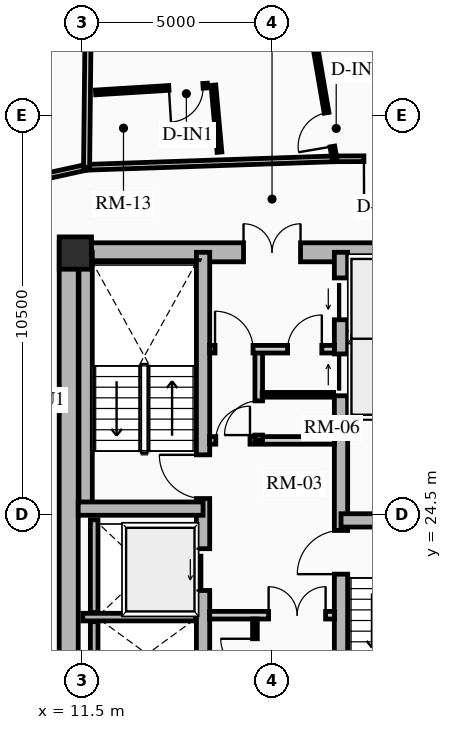
"""IFC4 building model, lengths in metres.
Left out: names, types, materials, properties, quantities, classifications, styles, units other than length and angle.
Written with IfcOpenShell. Run it as: python <this file> out.ifc"""

import sys

from ifc_helpers import new_model, si_unit, direction, frame, frame_2d, origin, origin_2d, place, context, subcontext, project, spatial, rectangle, extrude, source, transform, mapped, element, fill, save


model = new_model("IFC4")
c1 = context("Model", 3, precision=1e-05, world=origin(), true_north=direction((0.0, 1.0)))
c2 = subcontext(c1, "Body", "Model", "MODEL_VIEW")
j1 = project(units=[si_unit("LENGTHUNIT", "METRE"), si_unit("PLANEANGLEUNIT", "RADIAN")], contexts=[c1])
p1 = place(None, origin())
s1 = spatial("IfcSite", under=j1, at=p1, CompositionType="ELEMENT")
p2 = place(p1, origin())
s2 = spatial("IfcBuilding", under=s1, at=p2, CompositionType="ELEMENT")
p3 = place(p2, frame((0.0, 0.0, 36.55)))
s3 = spatial("IfcBuildingStorey", under=s2, at=p3, CompositionType="ELEMENT", Elevation=36.55)
p4 = place(p3, frame((11.15, 17.35, 0.0), z_axis=(0.0, 0.0, 1.0), x_axis=(0.0, 1.0, 0.0)))
e1 = element("IfcWall", 1, at=p4, inside=s3, PredefinedType="SHEAR", context=c2, shape_type="SweptSolid", body=[
    extrude(rectangle(XDim=14.3, YDim=0.5, at=frame_2d((7.15, 0.0))), origin(), (0.0, 0.0, 1.0), 2.91),
])
p5 = place(p3, frame((11.15, 31.4, 0.0), z_axis=(0.0, 0.0, 1.0), x_axis=(1.0, 0.0, 0.0)))
e2 = element("IfcWall", 2, at=p5, inside=s3, PredefinedType="SHEAR", context=c2, shape_type="SweptSolid", body=[
    extrude(rectangle(XDim=10.7, YDim=0.5, at=frame_2d((5.35, 0.0))), origin(), (0.0, 0.0, 1.0), 2.91),
])
m1 = source(origin(), c2, "Body", "SweptSolid", [
    extrude(rectangle(XDim=1.5, YDim=2.02, at=frame_2d((0.75, 1.01))), frame((0.0, 0.26, 0.0), z_axis=(0.0, -1.0, 0.0), x_axis=(1.0, 0.0, 0.0)), (0.0, 0.0, 1.0), 0.52),
])
p6 = place(p5, frame((4.6, 0.0, 0.0)))
e3 = element("IfcOpeningElement", 3, at=p6, cuts=e2, PredefinedType="OPENING", context=c2, shape_type="MappedRepresentation", body=[
    mapped(m1, transform((0.0, 0.0, 0.0), x_axis=(1.0, 0.0, 0.0), y_axis=(0.0, 1.0, 0.0), z_axis=(0.0, 0.0, 1.0), scale=1.0)),
])
p7 = place(p3, frame((14.685, 17.6, 0.0), z_axis=(0.0, 0.0, 1.0), x_axis=(0.0, 1.0, 0.0)))
e4 = element("IfcWall", 4, at=p7, inside=s3, PredefinedType="SHEAR", context=c2, shape_type="SweptSolid", body=[
    extrude(rectangle(XDim=13.8, YDim=0.35, at=frame_2d((6.9, 0.0))), origin(), (0.0, 0.0, 1.0), 2.91),
])
m2 = source(origin(), c2, "Body", "SweptSolid", [
    extrude(rectangle(XDim=1.1, YDim=2.015, at=frame_2d((0.55, 1.007))), frame((0.0, 0.185, 0.0), z_axis=(0.0, -1.0, 0.0), x_axis=(1.0, 0.0, 0.0)), (0.0, 0.0, 1.0), 0.37),
])
p8 = place(p7, frame((4.9, 0.0, 0.0)))
e5 = element("IfcOpeningElement", 5, at=p8, cuts=e4, PredefinedType="OPENING", context=c2, shape_type="MappedRepresentation", body=[
    mapped(m2, transform((0.0, 0.0, 0.0), x_axis=(1.0, 0.0, 0.0), y_axis=(0.0, 1.0, 0.0), z_axis=(0.0, 0.0, 1.0), scale=1.0)),
])
m3 = source(origin(), c2, "Body", "SweptSolid", [
    extrude(rectangle(XDim=1.15, YDim=2.02, at=frame_2d((0.575, 1.01))), frame((0.0, 0.185, 0.0), z_axis=(0.0, -1.0, 0.0), x_axis=(1.0, 0.0, 0.0)), (0.0, 0.0, 1.0), 0.37),
])
p9 = place(p7, frame((7.32, 0.0, 0.0)))
e6 = element("IfcOpeningElement", 6, at=p9, cuts=e4, PredefinedType="OPENING", context=c2, shape_type="MappedRepresentation", body=[
    mapped(m3, transform((0.0, 0.0, 0.0), x_axis=(1.0, 0.0, 0.0), y_axis=(0.0, 1.0, 0.0), z_axis=(0.0, 0.0, 1.0), scale=1.0)),
])
p10 = place(p3, frame((18.315, 17.6, 0.0), z_axis=(0.0, 0.0, 1.0), x_axis=(0.0, 1.0, 0.0)))
e7 = element("IfcWall", 7, at=p10, inside=s3, PredefinedType="SHEAR", context=c2, shape_type="SweptSolid", body=[
    extrude(rectangle(XDim=13.8, YDim=0.35, at=frame_2d((6.9, 0.0))), origin(), (0.0, 0.0, 1.0), 2.91),
])
p11 = place(p10, frame((10.025, 0.0, 0.0)))
e8 = element("IfcOpeningElement", 8, at=p11, cuts=e7, PredefinedType="OPENING", context=c2, shape_type="MappedRepresentation", body=[
    mapped(m2, transform((0.0, 0.0, 0.0), x_axis=(1.0, 0.0, 0.0), y_axis=(0.0, 1.0, 0.0), z_axis=(0.0, 0.0, 1.0), scale=1.0)),
])
p12 = place(p10, frame((12.025, 0.0, 0.0)))
e9 = element("IfcOpeningElement", 9, at=p12, cuts=e7, PredefinedType="OPENING", context=c2, shape_type="MappedRepresentation", body=[
    mapped(m2, transform((0.0, 0.0, 0.0), x_axis=(1.0, 0.0, 0.0), y_axis=(0.0, 1.0, 0.0), z_axis=(0.0, 0.0, 1.0), scale=1.0)),
])
p13 = place(p10, frame((5.33, 0.0, 0.0)))
e10 = element("IfcOpeningElement", 10, at=p13, cuts=e7, PredefinedType="OPENING", context=c2, shape_type="MappedRepresentation", body=[
    mapped(m3, transform((0.0, 0.0, 0.0), x_axis=(1.0, 0.0, 0.0), y_axis=(0.0, 1.0, 0.0), z_axis=(0.0, 0.0, 1.0), scale=1.0)),
])
p14 = place(p3, frame((11.595, 24.655, 0.0), z_axis=(0.0, 0.0, 1.0), x_axis=(0.0, 1.0, 0.0)))
e11 = element("IfcWall", 11, at=p14, inside=s3, PredefinedType="SHEAR", context=c2, shape_type="SweptSolid", body=[
    extrude(rectangle(XDim=6.745, YDim=0.35, at=frame_2d((3.373, 0.0))), origin(), (0.0, 0.0, 1.0), 2.91),
])
for number, where, z_axis, x_axis in (
    (12, (11.4, 24.655, 0.0), (0.0, 0.0, 1.0), (1.0, 0.0, 0.0)),
    (13, (18.315, 24.345, 0.0), (0.0, 0.0, 1.0), (1.0, 0.0, 0.0)),
):
    element("IfcWall", number, at=place(p3, frame(where, z_axis=z_axis, x_axis=x_axis)), inside=s3, PredefinedType="SHEAR", context=c2, shape_type="SweptSolid", body=[
        extrude(rectangle(XDim=3.285, YDim=0.35, at=frame_2d((1.643, 0.0))), origin(), (0.0, 0.0, 1.0), 2.91),
    ])
p15 = place(p3, frame((11.325, 31.38, 0.0), z_axis=(0.0, 0.0, 1.0), x_axis=(1.0, 0.0, 0.0)))
e14 = element("IfcColumn", 14, at=p15, inside=s3, PredefinedType="COLUMN", context=c2, shape_type="SweptSolid", body=[
    extrude(rectangle(XDim=0.85, YDim=0.85, at=origin_2d()), origin(), (0.0, 0.0, 1.0), 2.91),
])
p16 = place(p3, frame((11.52, 21.8, 0.0), z_axis=(0.0, 0.0, 1.0), x_axis=(1.0, 0.0, 0.0)))
e15 = element("IfcWall", 15, at=p16, inside=s3, PredefinedType="SHEAR", context=c2, shape_type="SweptSolid", body=[
    extrude(rectangle(XDim=2.97, YDim=0.2, at=frame_2d((1.485, 0.0))), origin(), (0.0, 0.0, 1.0), 2.91),
])
p17 = place(p3, frame((11.82, 21.92, 0.0), z_axis=(0.0, 0.0, 1.0), x_axis=(0.0, 1.0, 0.0)))
e16 = element("IfcWall", 16, at=p17, inside=s3, PredefinedType="SHEAR", context=c2, shape_type="SweptSolid", body=[
    extrude(rectangle(XDim=2.44, YDim=0.2, at=frame_2d((1.22, 0.0))), origin(), (0.0, 0.0, 1.0), 2.91),
])
p18 = place(p3, frame((11.82, 19.945, 0.0), z_axis=(0.0, 0.0, 1.0), x_axis=(0.0, 1.0, 0.0)))
e17 = element("IfcWall", 17, at=p18, inside=s3, PredefinedType="SHEAR", context=c2, shape_type="SweptSolid", body=[
    extrude(rectangle(XDim=1.735, YDim=0.2, at=frame_2d((0.867, 0.0))), origin(), (0.0, 0.0, 1.0), 2.91),
])
for number, where, z_axis, x_axis in (
    (18, (18.51, 27.13, 0.0), (0.0, 0.0, 1.0), (1.0, 0.0, 0.0)),
    (19, (18.51, 29.175, 0.0), (0.0, 0.0, 1.0), (1.0, 0.0, 0.0)),
):
    element("IfcWall", number, at=place(p3, frame(where, z_axis=z_axis, x_axis=x_axis)), inside=s3, PredefinedType="SHEAR", context=c2, shape_type="SweptSolid", body=[
        extrude(rectangle(XDim=2.97, YDim=0.2, at=frame_2d((1.485, 0.0))), origin(), (0.0, 0.0, 1.0), 2.91),
    ])
p19 = place(p3, frame((14.86, 21.85, 0.0), z_axis=(0.0, 0.0, 1.0), x_axis=(1.0, 0.0, 0.0)))
e20 = element("IfcWall", 20, at=p19, inside=s3, PredefinedType="PARTITIONING", context=c2, shape_type="SweptSolid", body=[
    extrude(rectangle(XDim=3.28, YDim=0.2, at=frame_2d((1.64, 0.0))), origin(), (0.0, 0.0, 1.0), 2.635),
])
m4 = source(origin(), c2, "Body", "SweptSolid", [
    extrude(rectangle(XDim=1.5, YDim=2.02, at=frame_2d((0.75, 1.01))), frame((0.0, 0.11, 0.0), z_axis=(0.0, -1.0, 0.0), x_axis=(1.0, 0.0, 0.0)), (0.0, 0.0, 1.0), 0.22),
])
p20 = place(p19, frame((1.55, 0.0, 0.0)))
e21 = element("IfcOpeningElement", 21, at=p20, cuts=e20, PredefinedType="OPENING", context=c2, shape_type="MappedRepresentation", body=[
    mapped(m4, transform((0.0, 0.0, 0.0), x_axis=(1.0, 0.0, 0.0), y_axis=(0.0, 1.0, 0.0), z_axis=(0.0, 0.0, 1.0), scale=1.0)),
])
p21 = place(p3, frame((14.86, 26.45, 0.0), z_axis=(0.0, 0.0, 1.0), x_axis=(1.0, 0.0, 0.0)))
e22 = element("IfcWall", 22, at=p21, inside=s3, PredefinedType="PARTITIONING", context=c2, shape_type="SweptSolid", body=[
    extrude(rectangle(XDim=3.28, YDim=0.2, at=frame_2d((1.64, 0.0))), origin(), (0.0, 0.0, 1.0), 2.635),
])
m5 = source(origin(), c2, "Body", "SweptSolid", [
    extrude(rectangle(XDim=0.9, YDim=2.005, at=frame_2d((0.45, 1.002))), frame((0.0, 0.11, 0.0), z_axis=(0.0, -1.0, 0.0), x_axis=(1.0, 0.0, 0.0)), (0.0, 0.0, 1.0), 0.22),
])
p22 = place(p21, frame((0.16, 0.0, 0.0)))
e23 = element("IfcOpeningElement", 23, at=p22, cuts=e22, PredefinedType="OPENING", context=c2, shape_type="MappedRepresentation", body=[
    mapped(m5, transform((0.0, 0.0, 0.0), x_axis=(1.0, 0.0, 0.0), y_axis=(0.0, 1.0, 0.0), z_axis=(0.0, 0.0, 1.0), scale=1.0)),
])
p23 = place(p3, frame((16.15, 26.45, 0.0), z_axis=(0.0, 0.0, 1.0), x_axis=(0.0, 1.0, 0.0)))
e24 = element("IfcWall", 24, at=p23, inside=s3, PredefinedType="PARTITIONING", context=c2, shape_type="SweptSolid", body=[
    extrude(rectangle(XDim=2.4, YDim=0.2, at=frame_2d((1.2, 0.0))), origin(), (0.0, 0.0, 1.0), 2.635),
])
p24 = place(p23, frame((0.14, 0.0, 0.0)))
e25 = element("IfcOpeningElement", 25, at=p24, cuts=e24, PredefinedType="OPENING", context=c2, shape_type="MappedRepresentation", body=[
    mapped(m5, transform((0.0, 0.0, 0.0), x_axis=(1.0, 0.0, 0.0), y_axis=(0.0, 1.0, 0.0), z_axis=(0.0, 0.0, 1.0), scale=1.0)),
])
p25 = place(p3, frame((14.86, 28.85, 0.0), z_axis=(0.0, 0.0, 1.0), x_axis=(1.0, 0.0, 0.0)))
e26 = element("IfcWall", 26, at=p25, inside=s3, PredefinedType="PARTITIONING", context=c2, shape_type="SweptSolid", body=[
    extrude(rectangle(XDim=3.28, YDim=0.2, at=frame_2d((1.64, 0.0))), origin(), (0.0, 0.0, 1.0), 2.635),
])
m6 = source(origin(), c2, "Body", "SweptSolid", [
    extrude(rectangle(XDim=1.0, YDim=2.015, at=frame_2d((0.5, 1.007))), frame((0.0, 0.11, 0.0), z_axis=(0.0, -1.0, 0.0), x_axis=(1.0, 0.0, 0.0)), (0.0, 0.0, 1.0), 0.22),
])
p26 = place(p25, frame((0.14, 0.0, 0.0)))
e27 = element("IfcOpeningElement", 27, at=p26, cuts=e26, PredefinedType="OPENING", context=c2, shape_type="MappedRepresentation", body=[
    mapped(m6, transform((0.0, 0.0, 0.0), x_axis=(1.0, 0.0, 0.0), y_axis=(0.0, 1.0, 0.0), z_axis=(0.0, 0.0, 1.0), scale=1.0)),
])
p27 = place(p25, frame((2.05, 0.0, 0.0)))
e28 = element("IfcOpeningElement", 28, at=p27, cuts=e26, PredefinedType="OPENING", context=c2, shape_type="MappedRepresentation", body=[
    mapped(m5, transform((0.0, 0.0, 0.0), x_axis=(1.0, 0.0, 0.0), y_axis=(0.0, 1.0, 0.0), z_axis=(0.0, 0.0, 1.0), scale=1.0)),
])
p28 = place(p3, frame((16.05, 19.88, 0.0), z_axis=(0.0, 0.0, 1.0), x_axis=(0.0, 1.0, 0.0)))
e29 = element("IfcWall", 29, at=p28, inside=s3, PredefinedType="PARTITIONING", context=c2, shape_type="SweptSolid", body=[
    extrude(rectangle(XDim=1.87, YDim=0.125, at=frame_2d((0.935, 0.0))), origin(), (0.0, 0.0, 1.0), 2.635),
])
m7 = source(origin(), c2, "Body", "SweptSolid", [
    extrude(rectangle(XDim=0.9, YDim=2.005, at=frame_2d((0.45, 1.002))), frame((0.0, 0.073, 0.0), z_axis=(0.0, -1.0, 0.0), x_axis=(1.0, 0.0, 0.0)), (0.0, 0.0, 1.0), 0.145),
])
p29 = place(p28, frame((0.45, 0.0, 0.0)))
e30 = element("IfcOpeningElement", 30, at=p29, cuts=e29, PredefinedType="OPENING", context=c2, shape_type="MappedRepresentation", body=[
    mapped(m7, transform((0.0, 0.0, 0.0), x_axis=(1.0, 0.0, 0.0), y_axis=(0.0, 1.0, 0.0), z_axis=(0.0, 0.0, 1.0), scale=1.0)),
])
p30 = place(p3, frame((16.24, 27.65, 0.0), z_axis=(0.0, 0.0, 1.0), x_axis=(1.0, 0.0, 0.0)))
e31 = element("IfcWall", 31, at=p30, inside=s3, PredefinedType="PARTITIONING", context=c2, shape_type="SweptSolid", body=[
    extrude(rectangle(XDim=1.88, YDim=0.125, at=frame_2d((0.94, 0.0))), origin(), (0.0, 0.0, 1.0), 2.635),
])
p31 = place(p3, frame((21.527, 33.873, 0.0), z_axis=(0.0, 0.0, 1.0), x_axis=(-0.999991838845, -0.004040079574, 0.0)))
e32 = element("IfcWall", 32, at=p31, inside=s3, PredefinedType="PARTITIONING", context=c2, shape_type="SweptSolid", body=[
    extrude(rectangle(XDim=3.384, YDim=0.15, at=frame_2d((1.692, 0.0))), origin(), (0.0, 0.0, 1.0), 2.159),
])
m8 = source(origin(), c2, "Body", "SweptSolid", [
    extrude(rectangle(XDim=1.05, YDim=2.015, at=frame_2d((0.525, 1.007))), frame((0.0, 0.085, 0.0), z_axis=(0.0, -1.0, 0.0), x_axis=(1.0, 0.0, 0.0)), (0.0, 0.0, 1.0), 0.17),
])
p32 = place(p31, frame((1.56, 0.0, 0.0)))
e33 = element("IfcOpeningElement", 33, at=p32, cuts=e32, PredefinedType="OPENING", context=c2, shape_type="MappedRepresentation", body=[
    mapped(m8, transform((0.0, 0.0, 0.0), x_axis=(1.0, 0.0, 0.0), y_axis=(0.0, 1.0, 0.0), z_axis=(0.0, 0.0, 1.0), scale=1.0)),
])
p33 = place(p3, frame((18.143, 33.86, 0.0), z_axis=(0.0, 0.0, 1.0), x_axis=(-0.999419208319, -0.034077060363, 0.0)))
e34 = element("IfcWall", 34, at=p33, inside=s3, PredefinedType="PARTITIONING", context=c2, shape_type="SweptSolid", body=[
    extrude(rectangle(XDim=6.527, YDim=0.15, at=frame_2d((3.263, 0.0))), origin(), (0.0, 0.0, 1.0), 2.159),
])
p34 = place(p3, frame((11.62, 33.637, 0.0), z_axis=(0.0, 0.0, 1.0), x_axis=(-0.97702579435, -0.213121085711, 0.0)))
e35 = element("IfcWall", 35, at=p34, inside=s3, PredefinedType="PARTITIONING", context=c2, shape_type="SweptSolid", body=[
    extrude(rectangle(XDim=1.935, YDim=0.15, at=frame_2d((0.967, 0.0))), origin(), (0.0, 0.0, 1.0), 2.159),
])
p35 = place(p3, frame((11.62, 33.637, 0.0), z_axis=(0.0, 0.0, 1.0), x_axis=(0.01090774254, 0.999940508807, 0.0)))
e36 = element("IfcWall", 36, at=p35, inside=s3, PredefinedType="PARTITIONING", context=c2, shape_type="SweptSolid", body=[
    extrude(rectangle(XDim=8.886, YDim=0.16, at=frame_2d((4.443, 0.0))), origin(), (0.0, 0.0, 1.0), 2.073),
])
p36 = place(p3, frame((18.143, 33.86, 0.0), z_axis=(0.0, 0.0, 1.0), x_axis=(-0.168840545196, 0.985643378864, 0.0)))
e37 = element("IfcWall", 37, at=p36, inside=s3, PredefinedType="PARTITIONING", context=c2, shape_type="SweptSolid", body=[
    extrude(rectangle(XDim=9.73, YDim=0.125, at=frame_2d((4.865, 0.0))), origin(), (0.0, 0.0, 1.0), 2.073),
])
p37 = place(p36, frame((0.33, 0.0, 0.0)))
e38 = element("IfcOpeningElement", 38, at=p37, cuts=e37, PredefinedType="OPENING", context=c2, shape_type="MappedRepresentation", body=[
    mapped(m7, transform((0.0, 0.0, 0.0), x_axis=(1.0, 0.0, 0.0), y_axis=(0.0, 1.0, 0.0), z_axis=(0.0, 0.0, 1.0), scale=1.0)),
])
p38 = place(p3, frame((15.117, 34.035, 0.0), z_axis=(0.0, 0.0, 1.0), x_axis=(-0.090498430303, 0.995896598103, 0.0)))
e39 = element("IfcWall", 39, at=p38, inside=s3, PredefinedType="PARTITIONING", context=c2, shape_type="SweptSolid", body=[
    extrude(rectangle(XDim=1.77, YDim=0.125, at=frame_2d((0.885, 0.0))), origin(), (0.0, 0.0, 1.0), 2.635),
])
p39 = place(p3, frame((14.803, 35.788, 0.0), z_axis=(0.0, 0.0, 1.0), x_axis=(-0.998116078946, -0.06135383403, 0.0)))
e40 = element("IfcWall", 40, at=p39, inside=s3, PredefinedType="PARTITIONING", context=c2, shape_type="SweptSolid", body=[
    extrude(rectangle(XDim=2.953, YDim=0.125, at=frame_2d((1.476, 0.0))), origin(), (0.0, 0.0, 1.0), 2.159),
])
p40 = place(p39, frame((0.12, 0.0, 0.0)))
e41 = element("IfcOpeningElement", 41, at=p40, cuts=e40, PredefinedType="OPENING", context=c2, shape_type="MappedRepresentation", body=[
    mapped(m7, transform((0.0, 0.0, 0.0), x_axis=(1.0, 0.0, 0.0), y_axis=(0.0, 1.0, 0.0), z_axis=(0.0, 0.0, 1.0), scale=1.0)),
])
m9 = source(origin(), c2, "Body", "SweptSolid", [
    extrude(rectangle(XDim=1.1, YDim=2.015, at=frame_2d((0.55, 1.007))), frame((0.0, 0.025, 0.0), z_axis=(0.0, -1.0, 0.0), x_axis=(1.0, 0.0, 0.0)), (0.0, 0.0, 1.0), 0.05),
])
p41 = place(p8, origin())
e42 = element("IfcDoor", 42, at=p41, inside=s3, OperationType="SLIDING_TO_LEFT", PredefinedType="DOOR", context=c2, shape_type="MappedRepresentation", body=[
    mapped(m9, transform((0.0, 0.0, 0.0), x_axis=(1.0, 0.0, 0.0), y_axis=(0.0, 1.0, 0.0), z_axis=(0.0, 0.0, 1.0), scale=1.0)),
])
fill(e5, e42)
p42 = place(p11, origin())
e43 = element("IfcDoor", 43, at=p42, inside=s3, OperationType="SLIDING_TO_RIGHT", PredefinedType="DOOR", context=c2, shape_type="MappedRepresentation", body=[
    mapped(m9, transform((0.0, 0.0, 0.0), x_axis=(1.0, 0.0, 0.0), y_axis=(0.0, 1.0, 0.0), z_axis=(0.0, 0.0, 1.0), scale=1.0)),
])
fill(e8, e43)
p43 = place(p12, origin())
e44 = element("IfcDoor", 44, at=p43, inside=s3, OperationType="SLIDING_TO_LEFT", PredefinedType="DOOR", context=c2, shape_type="MappedRepresentation", body=[
    mapped(m9, transform((0.0, 0.0, 0.0), x_axis=(1.0, 0.0, 0.0), y_axis=(0.0, 1.0, 0.0), z_axis=(0.0, 0.0, 1.0), scale=1.0)),
])
fill(e9, e44)
m10 = source(origin(), c2, "Body", "SweptSolid", [
    extrude(rectangle(XDim=1.15, YDim=2.02, at=frame_2d((0.575, 1.01))), frame((0.0, 0.025, 0.0), z_axis=(0.0, -1.0, 0.0), x_axis=(1.0, 0.0, 0.0)), (0.0, 0.0, 1.0), 0.05),
])
p44 = place(p9, origin())
e45 = element("IfcDoor", 45, at=p44, inside=s3, OperationType="SINGLE_SWING_RIGHT", PredefinedType="DOOR", context=c2, shape_type="MappedRepresentation", body=[
    mapped(m10, transform((0.0, 0.0, 0.0), x_axis=(1.0, 0.0, 0.0), y_axis=(0.0, 1.0, 0.0), z_axis=(0.0, 0.0, 1.0), scale=1.0)),
])
fill(e6, e45)
p45 = place(p13, origin())
e46 = element("IfcDoor", 46, at=p45, inside=s3, OperationType="SINGLE_SWING_LEFT", PredefinedType="DOOR", context=c2, shape_type="MappedRepresentation", body=[
    mapped(m10, transform((0.0, 0.0, 0.0), x_axis=(1.0, 0.0, 0.0), y_axis=(0.0, 1.0, 0.0), z_axis=(0.0, 0.0, 1.0), scale=1.0)),
])
fill(e10, e46)
m11 = source(origin(), c2, "Body", "SweptSolid", [
    extrude(rectangle(XDim=1.5, YDim=2.02, at=frame_2d((0.75, 1.01))), frame((0.0, 0.025, 0.0), z_axis=(0.0, -1.0, 0.0), x_axis=(1.0, 0.0, 0.0)), (0.0, 0.0, 1.0), 0.05),
])
p46 = place(p6, origin())
e47 = element("IfcDoor", 47, at=p46, inside=s3, OperationType="DOUBLE_DOOR_SINGLE_SWING", PredefinedType="DOOR", context=c2, shape_type="MappedRepresentation", body=[
    mapped(m11, transform((0.0, 0.0, 0.0), x_axis=(1.0, 0.0, 0.0), y_axis=(0.0, 1.0, 0.0), z_axis=(0.0, 0.0, 1.0), scale=1.0)),
])
fill(e3, e47)
p47 = place(p20, origin())
e48 = element("IfcDoor", 48, at=p47, inside=s3, OperationType="DOUBLE_DOOR_SINGLE_SWING", PredefinedType="DOOR", context=c2, shape_type="MappedRepresentation", body=[
    mapped(m11, transform((0.0, 0.0, 0.0), x_axis=(1.0, 0.0, 0.0), y_axis=(0.0, 1.0, 0.0), z_axis=(0.0, 0.0, 1.0), scale=1.0)),
])
fill(e21, e48)
m12 = source(origin(), c2, "Body", "SweptSolid", [
    extrude(rectangle(XDim=0.9, YDim=2.005, at=frame_2d((0.45, 1.002))), frame((0.0, 0.025, 0.0), z_axis=(0.0, -1.0, 0.0), x_axis=(1.0, 0.0, 0.0)), (0.0, 0.0, 1.0), 0.05),
])
p48 = place(p22, origin())
e49 = element("IfcDoor", 49, at=p48, inside=s3, OperationType="SINGLE_SWING_RIGHT", PredefinedType="DOOR", context=c2, shape_type="MappedRepresentation", body=[
    mapped(m12, transform((0.0, 0.0, 0.0), x_axis=(1.0, 0.0, 0.0), y_axis=(0.0, 1.0, 0.0), z_axis=(0.0, 0.0, 1.0), scale=1.0)),
])
fill(e23, e49)
m13 = source(origin(), c2, "Body", "SweptSolid", [
    extrude(rectangle(XDim=1.0, YDim=2.015, at=frame_2d((0.5, 1.007))), frame((0.0, 0.025, 0.0), z_axis=(0.0, -1.0, 0.0), x_axis=(1.0, 0.0, 0.0)), (0.0, 0.0, 1.0), 0.05),
])
p49 = place(p26, origin())
e50 = element("IfcDoor", 50, at=p49, inside=s3, OperationType="SINGLE_SWING_LEFT", PredefinedType="DOOR", context=c2, shape_type="MappedRepresentation", body=[
    mapped(m13, transform((0.0, 0.0, 0.0), x_axis=(1.0, 0.0, 0.0), y_axis=(0.0, 1.0, 0.0), z_axis=(0.0, 0.0, 1.0), scale=1.0)),
])
fill(e27, e50)
p50 = place(p29, origin())
e51 = element("IfcDoor", 51, at=p50, inside=s3, OperationType="SINGLE_SWING_RIGHT", PredefinedType="DOOR", context=c2, shape_type="MappedRepresentation", body=[
    mapped(m12, transform((0.0, 0.0, 0.0), x_axis=(1.0, 0.0, 0.0), y_axis=(0.0, 1.0, 0.0), z_axis=(0.0, 0.0, 1.0), scale=1.0)),
])
fill(e30, e51)
p51 = place(p24, origin())
e52 = element("IfcDoor", 52, at=p51, inside=s3, OperationType="SINGLE_SWING_LEFT", PredefinedType="DOOR", context=c2, shape_type="MappedRepresentation", body=[
    mapped(m12, transform((0.0, 0.0, 0.0), x_axis=(1.0, 0.0, 0.0), y_axis=(0.0, 1.0, 0.0), z_axis=(0.0, 0.0, 1.0), scale=1.0)),
])
fill(e25, e52)
p52 = place(p27, origin())
e53 = element("IfcDoor", 53, at=p52, inside=s3, OperationType="SINGLE_SWING_RIGHT", PredefinedType="DOOR", context=c2, shape_type="MappedRepresentation", body=[
    mapped(m12, transform((0.0, 0.0, 0.0), x_axis=(1.0, 0.0, 0.0), y_axis=(0.0, 1.0, 0.0), z_axis=(0.0, 0.0, 1.0), scale=1.0)),
])
fill(e28, e53)
m14 = source(origin(), c2, "Body", "SweptSolid", [
    extrude(rectangle(XDim=1.05, YDim=2.015, at=frame_2d((0.525, 1.007))), frame((0.0, 0.025, 0.0), z_axis=(0.0, -1.0, 0.0), x_axis=(1.0, 0.0, 0.0)), (0.0, 0.0, 1.0), 0.05),
])
p53 = place(p32, origin())
e54 = element("IfcDoor", 54, at=p53, inside=s3, OperationType="SINGLE_SWING_RIGHT", PredefinedType="DOOR", context=c2, shape_type="MappedRepresentation", body=[
    mapped(m14, transform((0.0, 0.0, 0.0), x_axis=(1.0, 0.0, 0.0), y_axis=(0.0, 1.0, 0.0), z_axis=(0.0, 0.0, 1.0), scale=1.0)),
])
fill(e33, e54)
p54 = place(p37, origin())
e55 = element("IfcDoor", 55, at=p54, inside=s3, OperationType="SINGLE_SWING_LEFT", PredefinedType="DOOR", context=c2, shape_type="MappedRepresentation", body=[
    mapped(m12, transform((0.0, 0.0, 0.0), x_axis=(1.0, 0.0, 0.0), y_axis=(0.0, 1.0, 0.0), z_axis=(0.0, 0.0, 1.0), scale=1.0)),
])
fill(e38, e55)
p55 = place(p40, origin())
e56 = element("IfcDoor", 56, at=p55, inside=s3, OperationType="SINGLE_SWING_RIGHT", PredefinedType="DOOR", context=c2, shape_type="MappedRepresentation", body=[
    mapped(m12, transform((0.0, 0.0, 0.0), x_axis=(1.0, 0.0, 0.0), y_axis=(0.0, 1.0, 0.0), z_axis=(0.0, 0.0, 1.0), scale=1.0)),
])
fill(e41, e56)
save(model, sys.argv[1])
